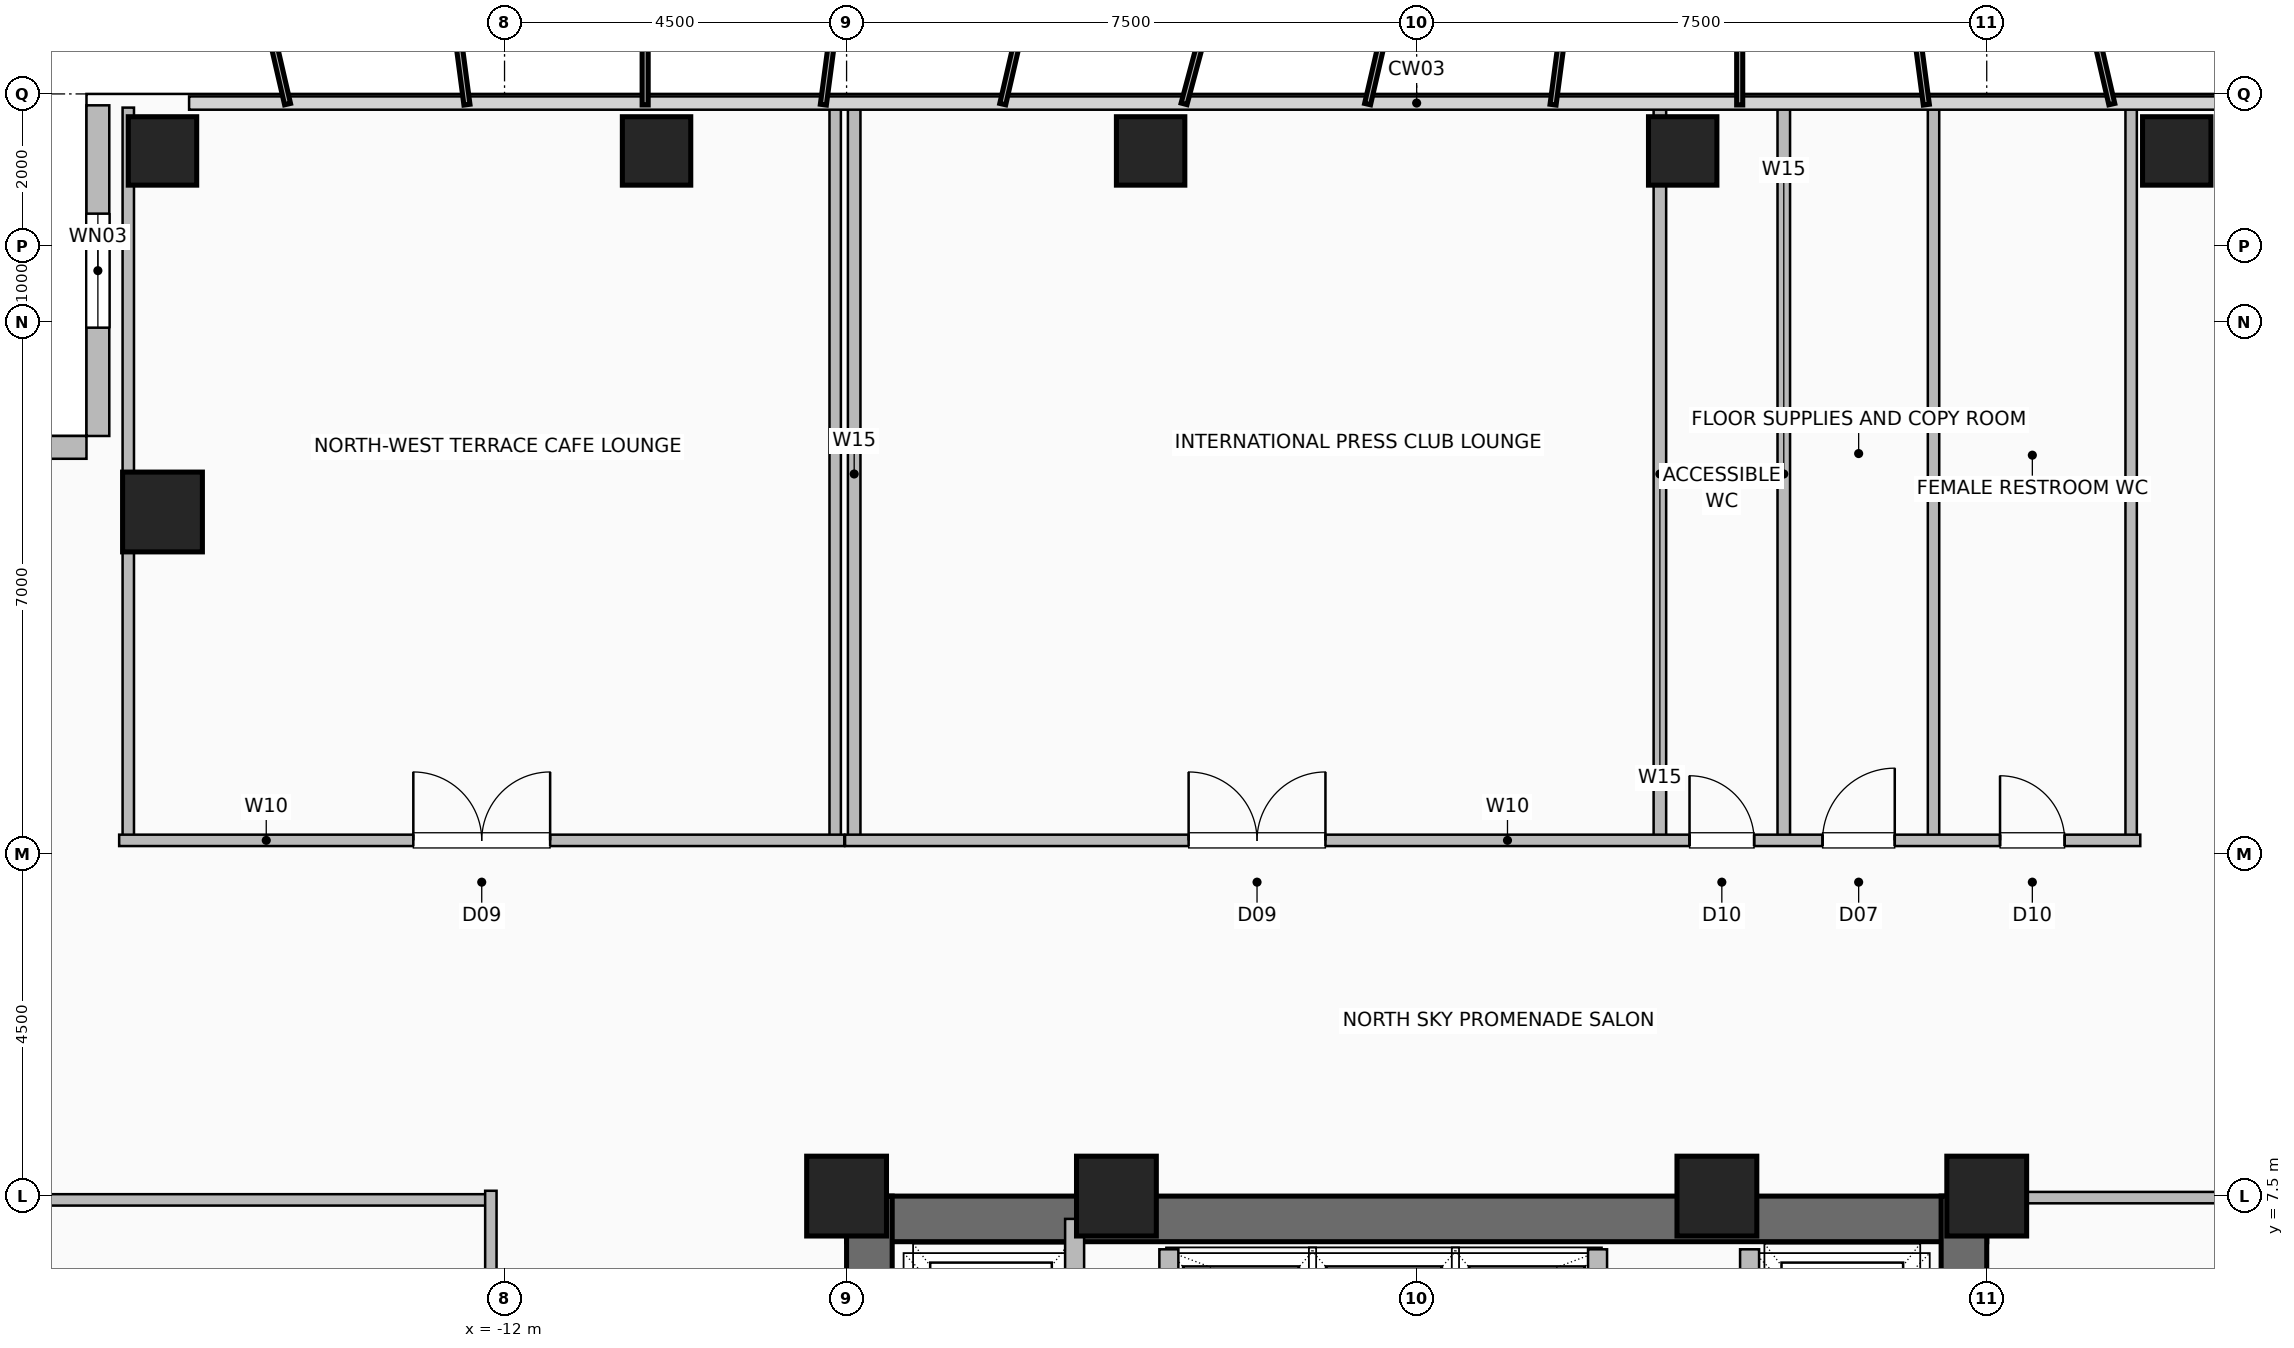
"""IFC4 building model, lengths in metres.
Left out: names, types, materials, properties, quantities, classifications, styles, units other than length and angle.
Written with IfcOpenShell. Run it as: python <this file> out.ifc"""

import sys

from ifc_helpers import new_model, si_unit, direction, frame, frame_2d, origin, origin_2d, place, context, subcontext, project, spatial, rectangle, hollow_rectangle, extrude, element, fill, save


model = new_model("IFC4")
c1 = context("Model", 3, precision=1e-05, world=origin(), true_north=direction((0.0, 1.0)))
c2 = subcontext(c1, "Body", "Model", "MODEL_VIEW")
j1 = project(units=[si_unit("LENGTHUNIT", "METRE"), si_unit("PLANEANGLEUNIT", "RADIAN")], contexts=[c1])
p1 = place(None, origin())
s1 = spatial("IfcSite", under=j1, at=p1, CompositionType="ELEMENT")
p2 = place(p1, origin())
s2 = spatial("IfcBuilding", under=s1, at=p2, CompositionType="ELEMENT")
p3 = place(p2, frame((0.0, 0.0, 126.4)))
s3 = spatial("IfcBuildingStorey", under=s2, at=p3, CompositionType="ELEMENT", Elevation=126.4)
for number, where, z_axis, x_axis in (
    (1, (7.5, 7.5, 0.0), (0.0, 0.0, 1.0), (1.0, 0.0, 0.0)),
    (2, (3.95, 7.5, 0.0), (0.0, 0.0, 1.0), (1.0, 0.0, 0.0)),
    (3, (-3.95, 7.5, 0.0), (0.0, 0.0, 1.0), (1.0, 0.0, 0.0)),
    (4, (-7.5, 7.5, 0.0), (0.0, 0.0, 1.0), (1.0, 0.0, 0.0)),
):
    element("IfcColumn", number, at=place(p3, frame(where, z_axis=z_axis, x_axis=x_axis)), inside=s3, PredefinedType="COLUMN", context=c2, shape_type="SweptSolid", body=[
        extrude(hollow_rectangle(XDim=1.05, YDim=1.05, WallThickness=0.05, at=origin_2d()), origin(), (0.0, 0.0, 1.0), 3.6),
    ])
for number, where, z_axis, x_axis in (
    (5, (-16.5, 21.25, 0.0), (0.0, 0.0, 1.0), (1.0, 0.0, 0.0)),
    (6, (-10.0, 21.25, 0.0), (0.0, 0.0, 1.0), (1.0, 0.0, 0.0)),
    (7, (-3.5, 21.25, 0.0), (0.0, 0.0, 1.0), (1.0, 0.0, 0.0)),
    (8, (3.5, 21.25, 0.0), (0.0, 0.0, 1.0), (1.0, 0.0, 0.0)),
    (9, (10.0, 21.25, 0.0), (0.0, 0.0, 1.0), (1.0, 0.0, 0.0)),
):
    element("IfcColumn", number, at=place(p3, frame(where, z_axis=z_axis, x_axis=x_axis)), inside=s3, PredefinedType="COLUMN", context=c2, shape_type="SweptSolid", body=[
        extrude(hollow_rectangle(XDim=0.9, YDim=0.9, WallThickness=0.045, at=origin_2d()), origin(), (0.0, 0.0, 1.0), 3.6),
    ])
p4 = place(p3, frame((-16.5, 16.5, 0.0), z_axis=(0.0, 0.0, 1.0), x_axis=(1.0, 0.0, 0.0)))
e10 = element("IfcColumn", 10, at=p4, inside=s3, PredefinedType="COLUMN", context=c2, shape_type="SweptSolid", body=[
    extrude(hollow_rectangle(XDim=1.05, YDim=1.05, WallThickness=0.05, at=origin_2d()), origin(), (0.0, 0.0, 1.0), 3.6),
])
p5 = place(p3, frame((-17.35, 21.85, 0.0), z_axis=(0.0, 0.0, 1.0), x_axis=(0.0, -1.0, 0.0)))
e11 = element("IfcWall", 11, at=p5, inside=s3, PredefinedType="SOLIDWALL", context=c2, shape_type="SweptSolid", body=[
    extrude(rectangle(XDim=4.35, YDim=0.3, at=frame_2d((2.175, 0.0))), origin(), (0.0, 0.0, 1.0), 3.36),
])
p6 = place(p5, frame((1.425, 0.0, 0.9)))
e12 = element("IfcOpeningElement", 12, at=p6, cuts=e11, PredefinedType="OPENING", context=c2, shape_type="SweptSolid", body=[
    extrude(rectangle(XDim=1.5, YDim=1.8, at=frame_2d((0.75, 0.9))), frame((0.0, 0.16, 0.0), z_axis=(0.0, -1.0, 0.0), x_axis=(1.0, 0.0, 0.0)), (0.0, 0.0, 1.0), 0.32),
])
p7 = place(p3, frame((-21.85, 17.35, 0.0), z_axis=(0.0, 0.0, 1.0), x_axis=(1.0, 0.0, 0.0)))
e13 = element("IfcWall", 13, at=p7, inside=s3, PredefinedType="SOLIDWALL", context=c2, shape_type="SweptSolid", body=[
    extrude(rectangle(XDim=4.35, YDim=0.3, at=frame_2d((2.175, 0.0))), origin(), (0.0, 0.0, 1.0), 3.36),
])
p8 = place(p3, frame((-7.5, 7.2, 0.0), z_axis=(0.0, 0.0, 1.0), x_axis=(1.0, 0.0, 0.0)))
e14 = element("IfcWall", 14, at=p8, inside=s3, PredefinedType="SHEAR", context=c2, shape_type="SweptSolid", body=[
    extrude(rectangle(XDim=15.0, YDim=0.6, at=frame_2d((7.5, 0.0))), origin(), (0.0, 0.0, 1.0), 3.36),
])
p9 = place(p3, frame((-7.2, -7.5, 0.0), z_axis=(0.0, 0.0, 1.0), x_axis=(0.0, 1.0, 0.0)))
e15 = element("IfcWall", 15, at=p9, inside=s3, PredefinedType="SHEAR", context=c2, shape_type="SweptSolid", body=[
    extrude(rectangle(XDim=15.0, YDim=0.6, at=frame_2d((7.5, 0.0))), origin(), (0.0, 0.0, 1.0), 3.36),
])
p10 = place(p9, frame((9.5, 0.0, 0.0)))
e16 = element("IfcOpeningElement", 16, at=p10, cuts=e15, PredefinedType="OPENING", context=c2, shape_type="SweptSolid", body=[
    extrude(rectangle(XDim=1.0, YDim=2.08, at=frame_2d((0.5, 1.04))), frame((0.0, 0.31, 0.0), z_axis=(0.0, -1.0, 0.0), x_axis=(1.0, 0.0, 0.0)), (0.0, 0.0, 1.0), 0.62),
])
p11 = place(p3, frame((7.2, -7.5, 0.0), z_axis=(0.0, 0.0, 1.0), x_axis=(0.0, 1.0, 0.0)))
e17 = element("IfcWall", 17, at=p11, inside=s3, PredefinedType="SHEAR", context=c2, shape_type="SweptSolid", body=[
    extrude(rectangle(XDim=15.0, YDim=0.6, at=frame_2d((7.5, 0.0))), origin(), (0.0, 0.0, 1.0), 3.36),
])
for number, where, z_axis, x_axis in (
    (18, (-3.26, 4.58, 0.0), (0.0, 0.0, 1.0), (0.0, 1.0, 0.0)),
    (19, (2.38, 4.58, 0.0), (0.0, 0.0, 1.0), (0.0, 1.0, 0.0)),
):
    element("IfcWall", number, at=place(p3, frame(where, z_axis=z_axis, x_axis=x_axis)), inside=s3, PredefinedType="SHEAR", context=c2, shape_type="SweptSolid", body=[
        extrude(rectangle(XDim=2.22, YDim=0.25, at=frame_2d((1.11, 0.0))), origin(), (0.0, 0.0, 1.0), 3.36),
    ])
p12 = place(p3, frame((-4.5, 4.35, 0.0), z_axis=(0.0, 0.0, 1.0), x_axis=(0.0, 1.0, 0.0)))
e20 = element("IfcWall", 20, at=p12, inside=s3, PredefinedType="SHEAR", context=c2, shape_type="SweptSolid", body=[
    extrude(rectangle(XDim=2.85, YDim=0.25, at=frame_2d((1.425, 0.0))), origin(), (0.0, 0.0, 1.0), 3.36),
])
p13 = place(p3, frame((4.38, 4.3, 0.0), z_axis=(0.0, 0.0, 1.0), x_axis=(0.0, 1.0, 0.0)))
e21 = element("IfcWall", 21, at=p13, inside=s3, PredefinedType="SHEAR", context=c2, shape_type="SweptSolid", body=[
    extrude(rectangle(XDim=2.5, YDim=0.25, at=frame_2d((1.25, 0.0))), origin(), (0.0, 0.0, 1.0), 3.36),
])
p14 = place(p13, frame((0.8, 0.0, 0.0)))
e22 = element("IfcOpeningElement", 22, at=p14, cuts=e21, PredefinedType="OPENING", context=c2, shape_type="SweptSolid", body=[
    extrude(rectangle(XDim=1.2, YDim=2.2, at=frame_2d((0.6, 1.1))), frame((0.0, 0.135, 0.0), z_axis=(0.0, -1.0, 0.0), x_axis=(1.0, 0.0, 0.0)), (0.0, 0.0, 1.0), 0.27),
])
p15 = place(p3, frame((-21.82, 7.45, 0.0), z_axis=(0.0, 0.0, 1.0), x_axis=(1.0, 0.0, 0.0)))
e23 = element("IfcWall", 23, at=p15, inside=s3, PredefinedType="PARTITIONING", context=c2, shape_type="SweptSolid", body=[
    extrude(rectangle(XDim=9.64, YDim=0.15, at=frame_2d((4.82, 0.0))), origin(), (0.0, 0.0, 1.0), 3.36),
])
p16 = place(p3, frame((-12.18, -7.57, 0.0), z_axis=(0.0, 0.0, 1.0), x_axis=(0.0, 1.0, 0.0)))
e24 = element("IfcWall", 24, at=p16, inside=s3, PredefinedType="PARTITIONING", context=c2, shape_type="SweptSolid", body=[
    extrude(rectangle(XDim=15.14, YDim=0.15, at=frame_2d((7.57, 0.0))), origin(), (0.0, 0.0, 1.0), 3.36),
])
p17 = place(p16, frame((3.695, 0.0, 0.0)))
e25 = element("IfcOpeningElement", 25, at=p17, cuts=e24, PredefinedType="OPENING", context=c2, shape_type="SweptSolid", body=[
    extrude(rectangle(XDim=1.8, YDim=2.08, at=frame_2d((0.9, 1.04))), frame((0.0, 0.085, 0.0), z_axis=(0.0, -1.0, 0.0), x_axis=(1.0, 0.0, 0.0)), (0.0, 0.0, 1.0), 0.17),
])
p18 = place(p16, frame((11.57, 0.0, 0.0)))
e26 = element("IfcOpeningElement", 26, at=p18, cuts=e24, PredefinedType="OPENING", context=c2, shape_type="SweptSolid", body=[
    extrude(rectangle(XDim=0.95, YDim=2.06, at=frame_2d((0.475, 1.03))), frame((0.0, 0.085, 0.0), z_axis=(0.0, -1.0, 0.0), x_axis=(1.0, 0.0, 0.0)), (0.0, 0.0, 1.0), 0.17),
])
for number, where, z_axis, x_axis in (
    (27, (-16.95, 12.18, 0.0), (0.0, 0.0, 1.0), (0.0, 1.0, 0.0)),
    (28, (-7.65, 12.18, 0.0), (0.0, 0.0, 1.0), (0.0, 1.0, 0.0)),
):
    element("IfcWall", number, at=place(p3, frame(where, z_axis=z_axis, x_axis=x_axis)), inside=s3, PredefinedType="PARTITIONING", context=c2, shape_type="SweptSolid", body=[
        extrude(rectangle(XDim=9.64, YDim=0.15, at=frame_2d((4.82, 0.0))), origin(), (0.0, 0.0, 1.0), 3.36),
    ])
p19 = place(p3, frame((-17.07, 12.18, 0.0), z_axis=(0.0, 0.0, 1.0), x_axis=(1.0, 0.0, 0.0)))
e29 = element("IfcWall", 29, at=p19, inside=s3, PredefinedType="PARTITIONING", context=c2, shape_type="SweptSolid", body=[
    extrude(rectangle(XDim=9.54, YDim=0.15, at=frame_2d((4.77, 0.0))), origin(), (0.0, 0.0, 1.0), 3.36),
])
p20 = place(p19, frame((3.87, 0.0, 0.0)))
e30 = element("IfcOpeningElement", 30, at=p20, cuts=e29, PredefinedType="OPENING", context=c2, shape_type="SweptSolid", body=[
    extrude(rectangle(XDim=1.8, YDim=2.08, at=frame_2d((0.9, 1.04))), frame((0.0, 0.085, 0.0), z_axis=(0.0, -1.0, 0.0), x_axis=(1.0, 0.0, 0.0)), (0.0, 0.0, 1.0), 0.17),
])
for number, where, z_axis, x_axis in (
    (31, (4.83, 12.18, 0.0), (0.0, 0.0, 1.0), (0.0, 1.0, 0.0)),
    (32, (-7.4, 12.18, 0.0), (0.0, 0.0, 1.0), (0.0, 1.0, 0.0)),
    (33, (3.2, 12.18, 0.0), (0.0, 0.0, 1.0), (0.0, 1.0, 0.0)),
):
    element("IfcWall", number, at=place(p3, frame(where, z_axis=z_axis, x_axis=x_axis)), inside=s3, PredefinedType="PLUMBINGWALL", context=c2, shape_type="SweptSolid", body=[
        extrude(rectangle(XDim=9.64, YDim=0.165, at=frame_2d((4.82, 0.0))), origin(), (0.0, 0.0, 1.0), 3.36),
    ])
for number, where, z_axis, x_axis in (
    (34, (6.8, 12.18, 0.0), (0.0, 0.0, 1.0), (0.0, 1.0, 0.0)),
    (35, (9.4, 12.18, 0.0), (0.0, 0.0, 1.0), (0.0, 1.0, 0.0)),
):
    element("IfcWall", number, at=place(p3, frame(where, z_axis=z_axis, x_axis=x_axis)), inside=s3, PredefinedType="PARTITIONING", context=c2, shape_type="SweptSolid", body=[
        extrude(rectangle(XDim=9.64, YDim=0.15, at=frame_2d((4.82, 0.0))), origin(), (0.0, 0.0, 1.0), 3.36),
    ])
p21 = place(p3, frame((-7.52, 12.18, 0.0), z_axis=(0.0, 0.0, 1.0), x_axis=(1.0, 0.0, 0.0)))
e36 = element("IfcWall", 36, at=p21, inside=s3, PredefinedType="PARTITIONING", context=c2, shape_type="SweptSolid", body=[
    extrude(rectangle(XDim=17.04, YDim=0.15, at=frame_2d((8.52, 0.0))), origin(), (0.0, 0.0, 1.0), 3.36),
])
p22 = place(p21, frame((4.52, 0.0, 0.0)))
e37 = element("IfcOpeningElement", 37, at=p22, cuts=e36, PredefinedType="OPENING", context=c2, shape_type="SweptSolid", body=[
    extrude(rectangle(XDim=1.8, YDim=2.08, at=frame_2d((0.9, 1.04))), frame((0.0, 0.085, 0.0), z_axis=(0.0, -1.0, 0.0), x_axis=(1.0, 0.0, 0.0)), (0.0, 0.0, 1.0), 0.17),
])
p23 = place(p21, frame((11.11, 0.0, 0.0)))
e38 = element("IfcOpeningElement", 38, at=p23, cuts=e36, PredefinedType="OPENING", context=c2, shape_type="SweptSolid", body=[
    extrude(rectangle(XDim=0.85, YDim=2.05, at=frame_2d((0.425, 1.025))), frame((0.0, 0.085, 0.0), z_axis=(0.0, -1.0, 0.0), x_axis=(1.0, 0.0, 0.0)), (0.0, 0.0, 1.0), 0.17),
])
p24 = place(p21, frame((12.86, 0.0, 0.0)))
e39 = element("IfcOpeningElement", 39, at=p24, cuts=e36, PredefinedType="OPENING", context=c2, shape_type="SweptSolid", body=[
    extrude(rectangle(XDim=0.95, YDim=2.06, at=frame_2d((0.475, 1.03))), frame((0.0, 0.085, 0.0), z_axis=(0.0, -1.0, 0.0), x_axis=(1.0, 0.0, 0.0)), (0.0, 0.0, 1.0), 0.17),
])
p25 = place(p21, frame((15.195, 0.0, 0.0)))
e40 = element("IfcOpeningElement", 40, at=p25, cuts=e36, PredefinedType="OPENING", context=c2, shape_type="SweptSolid", body=[
    extrude(rectangle(XDim=0.85, YDim=2.05, at=frame_2d((0.425, 1.025))), frame((0.0, 0.085, 0.0), z_axis=(0.0, -1.0, 0.0), x_axis=(1.0, 0.0, 0.0)), (0.0, 0.0, 1.0), 0.17),
])
p26 = place(p3, frame((7.6, 7.48, 0.0), z_axis=(0.0, 0.0, 1.0), x_axis=(1.0, 0.0, 0.0)))
e41 = element("IfcWall", 41, at=p26, inside=s3, PredefinedType="PARTITIONING", context=c2, shape_type="SweptSolid", body=[
    extrude(rectangle(XDim=14.22, YDim=0.15, at=frame_2d((7.11, 0.0))), origin(), (0.0, 0.0, 1.0), 3.36),
])
p27 = place(p6, origin())
e42 = element("IfcWindow", 42, at=p27, inside=s3, PartitioningType="SINGLE_PANEL", PredefinedType="WINDOW", context=c2, shape_type="SweptSolid", body=[
    extrude(rectangle(XDim=1.5, YDim=1.8, at=frame_2d((0.75, 0.9))), frame((0.0, 0.03, 0.0), z_axis=(0.0, -1.0, 0.0), x_axis=(1.0, 0.0, 0.0)), (0.0, 0.0, 1.0), 0.06),
])
fill(e12, e42)
p28 = place(p20, origin())
e43 = element("IfcDoor", 43, at=p28, inside=s3, OperationType="DOUBLE_DOOR_SINGLE_SWING", PredefinedType="DOOR", context=c2, shape_type="SweptSolid", body=[
    extrude(rectangle(XDim=1.8, YDim=2.08, at=frame_2d((0.9, 1.04))), frame((0.0, 0.025, 0.0), z_axis=(0.0, -1.0, 0.0), x_axis=(1.0, 0.0, 0.0)), (0.0, 0.0, 1.0), 0.05),
])
fill(e30, e43)
p29 = place(p22, origin())
e44 = element("IfcDoor", 44, at=p29, inside=s3, OperationType="DOUBLE_DOOR_SINGLE_SWING", PredefinedType="DOOR", context=c2, shape_type="SweptSolid", body=[
    extrude(rectangle(XDim=1.8, YDim=2.08, at=frame_2d((0.9, 1.04))), frame((0.0, 0.025, 0.0), z_axis=(0.0, -1.0, 0.0), x_axis=(1.0, 0.0, 0.0)), (0.0, 0.0, 1.0), 0.05),
])
fill(e37, e44)
p30 = place(p23, origin())
e45 = element("IfcDoor", 45, at=p30, inside=s3, OperationType="SINGLE_SWING_LEFT", PredefinedType="DOOR", context=c2, shape_type="SweptSolid", body=[
    extrude(rectangle(XDim=0.85, YDim=2.05, at=frame_2d((0.425, 1.025))), frame((0.0, 0.025, 0.0), z_axis=(0.0, -1.0, 0.0), x_axis=(1.0, 0.0, 0.0)), (0.0, 0.0, 1.0), 0.05),
])
fill(e38, e45)
p31 = place(p24, origin())
e46 = element("IfcDoor", 46, at=p31, inside=s3, OperationType="SINGLE_SWING_RIGHT", PredefinedType="DOOR", context=c2, shape_type="SweptSolid", body=[
    extrude(rectangle(XDim=0.95, YDim=2.06, at=frame_2d((0.475, 1.03))), frame((0.0, 0.025, 0.0), z_axis=(0.0, -1.0, 0.0), x_axis=(1.0, 0.0, 0.0)), (0.0, 0.0, 1.0), 0.05),
])
fill(e39, e46)
p32 = place(p25, origin())
e47 = element("IfcDoor", 47, at=p32, inside=s3, OperationType="SINGLE_SWING_LEFT", PredefinedType="DOOR", context=c2, shape_type="SweptSolid", body=[
    extrude(rectangle(XDim=0.85, YDim=2.05, at=frame_2d((0.425, 1.025))), frame((0.0, 0.025, 0.0), z_axis=(0.0, -1.0, 0.0), x_axis=(1.0, 0.0, 0.0)), (0.0, 0.0, 1.0), 0.05),
])
fill(e40, e47)
save(model, sys.argv[1])
